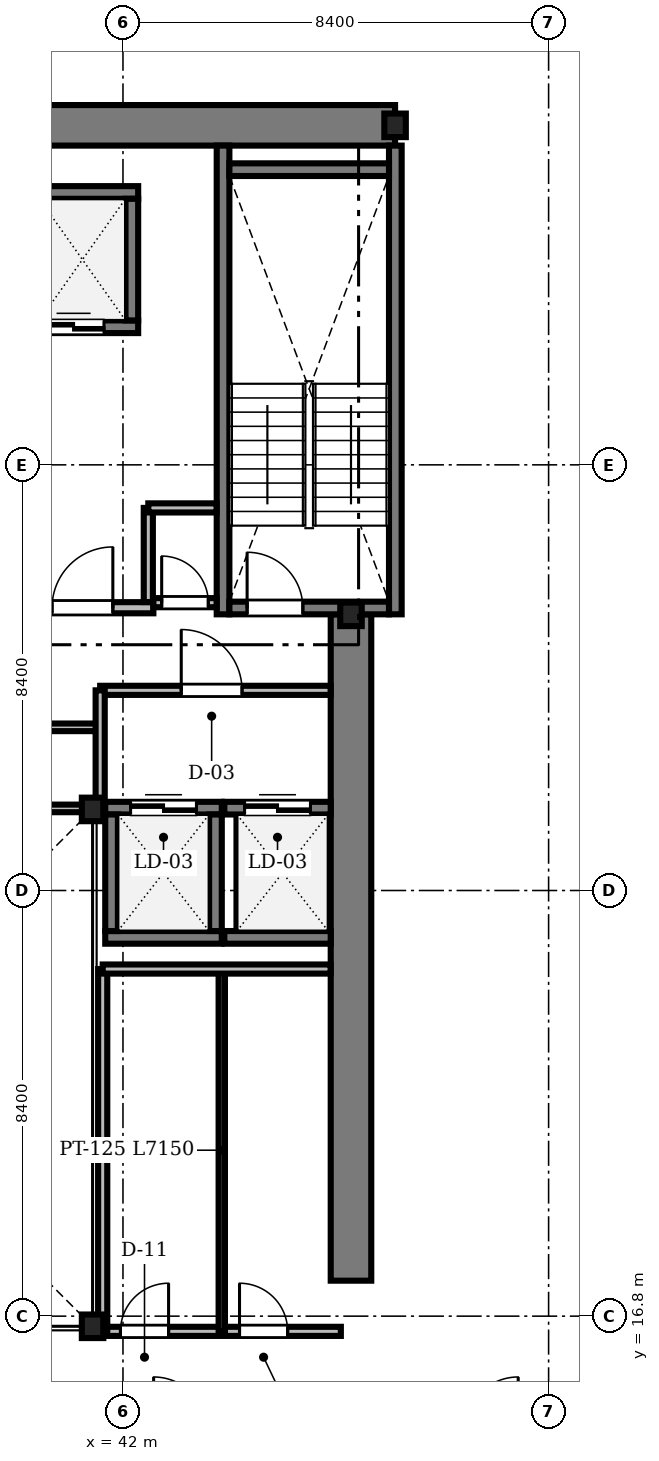
"""IFC4 building model, lengths in metres.
Left out: names, types, materials, properties, quantities, classifications, styles, units other than length and angle.
Written with IfcOpenShell. Run it as: python <this file> out.ifc"""

import sys

from ifc_helpers import new_model, si_unit, direction, frame, frame_2d, origin, origin_2d, place, context, subcontext, project, spatial, rectangle, i_section, extrude, source, transform, mapped, element, fill, save


model = new_model("IFC4")
c1 = context("Model", 3, precision=1e-05, world=origin(), true_north=direction((0.0, 1.0)))
c2 = subcontext(c1, "Body", "Model", "MODEL_VIEW")
j1 = project(units=[si_unit("LENGTHUNIT", "METRE"), si_unit("PLANEANGLEUNIT", "RADIAN")], contexts=[c1])
p1 = place(None, origin())
s1 = spatial("IfcSite", under=j1, at=p1, CompositionType="ELEMENT")
p2 = place(p1, origin())
s2 = spatial("IfcBuilding", under=s1, at=p2, CompositionType="ELEMENT")
p3 = place(p2, frame((0.0, 0.0, 103.7)))
s3 = spatial("IfcBuildingStorey", under=s2, at=p3, CompositionType="ELEMENT", Elevation=103.7)
m1 = source(origin(), c2, "Body", "SweptSolid", [
    extrude(rectangle(XDim=17.52, YDim=0.8, at=frame_2d((8.76, 0.0))), origin(), (0.0, 0.0, 1.0), 3.56),
])
p4 = place(p3, frame((29.85, 40.3, 0.0), z_axis=(0.0, 0.0, 1.0), x_axis=(1.0, 0.0, 0.0)))
e1 = element("IfcWall", 1, at=p4, inside=s3, PredefinedType="SHEAR", context=c2, shape_type="MappedRepresentation", body=[
    mapped(m1, transform((0.0, 0.0, 0.0), scale=1.0)),
])
m2 = source(origin(), c2, "Body", "SweptSolid", [
    extrude(rectangle(XDim=13.15, YDim=0.8, at=frame_2d((6.575, 0.0))), origin(), (0.0, 0.0, 1.0), 3.56),
])
p5 = place(p3, frame((46.5, 17.5, 0.0), z_axis=(0.0, 0.0, 1.0), x_axis=(0.0, 1.0, 0.0)))
e2 = element("IfcWall", 2, at=p5, inside=s3, PredefinedType="SHEAR", context=c2, shape_type="MappedRepresentation", body=[
    mapped(m2, transform((0.0, 0.0, 0.0), scale=1.0)),
])
m3 = source(origin(), c2, "Body", "SweptSolid", [
    extrude(i_section(OverallWidth=0.424, OverallDepth=0.465, WebThickness=0.035, FlangeThickness=0.056, FilletRadius=0.015, at=origin_2d()), origin(), (0.0, 0.0, 1.0), 3.56),
])
for number, where, z_axis, x_axis in (
    (3, (41.4, 16.6, 0.0), (0.0, 0.0, 1.0), (1.0, 0.0, 0.0)),
    (4, (41.4, 26.8, 0.0), (0.0, 0.0, 1.0), (1.0, 0.0, 0.0)),
    (5, (46.5, 30.65, 0.0), (0.0, 0.0, 1.0), (1.0, 0.0, 0.0)),
    (6, (47.37, 40.3, 0.0), (0.0, 0.0, 1.0), (1.0, 0.0, 0.0)),
):
    element("IfcColumn", number, at=place(p3, frame(where, z_axis=z_axis, x_axis=x_axis)), inside=s3, PredefinedType="COLUMN", context=c2, shape_type="MappedRepresentation", body=[
        mapped(m3, transform((0.0, 0.0, 0.0), scale=1.0)),
    ])
m4 = source(origin(), c2, "Body", "SweptSolid", [
    extrude(rectangle(XDim=9.25, YDim=0.25, at=frame_2d((4.625, 0.0))), origin(), (0.0, 0.0, 1.0), 3.6),
])
for number, where, z_axis, x_axis in (
    (7, (43.975, 30.65, 0.0), (0.0, 0.0, 1.0), (0.0, 1.0, 0.0)),
    (8, (47.375, 30.65, 0.0), (0.0, 0.0, 1.0), (0.0, 1.0, 0.0)),
):
    element("IfcWall", number, at=place(p3, frame(where, z_axis=z_axis, x_axis=x_axis)), inside=s3, PredefinedType="SOLIDWALL", context=c2, shape_type="MappedRepresentation", body=[
        mapped(m4, transform((0.0, 0.0, 0.0), scale=1.0)),
    ])
m5 = source(origin(), c2, "Body", "SweptSolid", [
    extrude(rectangle(XDim=3.15, YDim=0.25, at=frame_2d((1.575, 0.0))), origin(), (0.0, 0.0, 1.0), 3.6),
])
p6 = place(p3, frame((44.1, 39.425, 0.0), z_axis=(0.0, 0.0, 1.0), x_axis=(1.0, 0.0, 0.0)))
e9 = element("IfcWall", 9, at=p6, inside=s3, PredefinedType="SOLIDWALL", context=c2, shape_type="MappedRepresentation", body=[
    mapped(m5, transform((0.0, 0.0, 0.0), scale=1.0)),
])
p7 = place(p3, frame((44.1, 30.775, 0.0), z_axis=(0.0, 0.0, 1.0), x_axis=(1.0, 0.0, 0.0)))
e10 = element("IfcWall", 10, at=p7, inside=s3, PredefinedType="SOLIDWALL", context=c2, shape_type="MappedRepresentation", body=[
    mapped(m5, transform((0.0, 0.0, 0.0), scale=1.0)),
])
m6 = source(origin(), c2, "Body", "SweptSolid", [
    extrude(rectangle(XDim=1.1, YDim=2.2, at=frame_2d((0.55, 1.1))), frame((0.0, 0.135, 0.0), z_axis=(0.0, -1.0, 0.0), x_axis=(1.0, 0.0, 0.0)), (0.0, 0.0, 1.0), 0.27),
])
p8 = place(p7, frame((0.35, 0.0, 0.0)))
e11 = element("IfcOpeningElement", 11, at=p8, cuts=e10, PredefinedType="OPENING", context=c2, shape_type="MappedRepresentation", body=[
    mapped(m6, transform((0.0, 0.0, 0.0), scale=1.0)),
])
m7 = source(origin(), c2, "Body", "SweptSolid", [
    extrude(rectangle(XDim=2.8, YDim=0.22, at=frame_2d((1.4, 0.0))), origin(), (0.0, 0.0, 1.0), 3.56),
])
p9 = place(p3, frame((39.8, 30.78, 0.0), z_axis=(0.0, 0.0, 1.0), x_axis=(1.0, 0.0, 0.0)))
e12 = element("IfcWall", 12, at=p9, inside=s3, PredefinedType="SOLIDWALL", context=c2, shape_type="MappedRepresentation", body=[
    mapped(m7, transform((0.0, 0.0, 0.0), scale=1.0)),
])
m8 = source(origin(), c2, "Body", "SweptSolid", [
    extrude(rectangle(XDim=1.2, YDim=2.2, at=frame_2d((0.6, 1.1))), frame((0.0, 0.12, 0.0), z_axis=(0.0, -1.0, 0.0), x_axis=(1.0, 0.0, 0.0)), (0.0, 0.0, 1.0), 0.24),
])
p10 = place(p9, frame((0.8, 0.0, 0.0)))
e13 = element("IfcOpeningElement", 13, at=p10, cuts=e12, PredefinedType="OPENING", context=c2, shape_type="MappedRepresentation", body=[
    mapped(m8, transform((0.0, 0.0, 0.0), scale=1.0)),
])
m9 = source(origin(), c2, "Body", "SweptSolid", [
    extrude(rectangle(XDim=2.55, YDim=0.25, at=frame_2d((1.275, 0.0))), origin(), (0.0, 0.0, 1.0), 3.56),
])
p11 = place(p3, frame((39.75, 36.325, 0.0), z_axis=(0.0, 0.0, 1.0), x_axis=(1.0, 0.0, 0.0)))
e14 = element("IfcWall", 14, at=p11, inside=s3, PredefinedType="SOLIDWALL", context=c2, shape_type="MappedRepresentation", body=[
    mapped(m9, transform((0.0, 0.0, 0.0), scale=1.0)),
])
m10 = source(origin(), c2, "Body", "SweptSolid", [
    extrude(rectangle(XDim=1.2, YDim=2.25, at=frame_2d((0.6, 1.125))), frame((0.0, 0.135, 0.0), z_axis=(0.0, -1.0, 0.0), x_axis=(1.0, 0.0, 0.0)), (0.0, 0.0, 1.0), 0.27),
])
p12 = place(p11, frame((0.675, 0.0, 0.0)))
e15 = element("IfcOpeningElement", 15, at=p12, cuts=e14, PredefinedType="OPENING", context=c2, shape_type="MappedRepresentation", body=[
    mapped(m10, transform((0.0, 0.0, 0.0), scale=1.0)),
])
p13 = place(p3, frame((39.75, 38.975, 0.0), z_axis=(0.0, 0.0, 1.0), x_axis=(1.0, 0.0, 0.0)))
e16 = element("IfcWall", 16, at=p13, inside=s3, PredefinedType="SOLIDWALL", context=c2, shape_type="MappedRepresentation", body=[
    mapped(m9, transform((0.0, 0.0, 0.0), scale=1.0)),
])
m11 = source(origin(), c2, "Body", "SweptSolid", [
    extrude(rectangle(XDim=2.4, YDim=0.25, at=frame_2d((1.2, 0.0))), origin(), (0.0, 0.0, 1.0), 3.56),
])
p14 = place(p3, frame((42.175, 36.45, 0.0), z_axis=(0.0, 0.0, 1.0), x_axis=(0.0, 1.0, 0.0)))
e17 = element("IfcWall", 17, at=p14, inside=s3, PredefinedType="SOLIDWALL", context=c2, shape_type="MappedRepresentation", body=[
    mapped(m11, transform((0.0, 0.0, 0.0), scale=1.0)),
])
m12 = source(origin(), c2, "Body", "SweptSolid", [
    extrude(rectangle(XDim=2.3, YDim=0.25, at=frame_2d((1.15, 0.0))), origin(), (0.0, 0.0, 1.0), 3.56),
])
p15 = place(p3, frame((41.65, 24.275, 0.0), z_axis=(0.0, 0.0, 1.0), x_axis=(1.0, 0.0, 0.0)))
e18 = element("IfcWall", 18, at=p15, inside=s3, PredefinedType="SOLIDWALL", context=c2, shape_type="MappedRepresentation", body=[
    mapped(m12, transform((0.0, 0.0, 0.0), scale=1.0)),
])
p16 = place(p3, frame((41.65, 26.825, 0.0), z_axis=(0.0, 0.0, 1.0), x_axis=(1.0, 0.0, 0.0)))
e19 = element("IfcWall", 19, at=p16, inside=s3, PredefinedType="SOLIDWALL", context=c2, shape_type="MappedRepresentation", body=[
    mapped(m12, transform((0.0, 0.0, 0.0), scale=1.0)),
])
m13 = source(origin(), c2, "Body", "SweptSolid", [
    extrude(rectangle(XDim=1.3, YDim=2.3, at=frame_2d((0.65, 1.15))), frame((0.0, 0.135, 0.0), z_axis=(0.0, -1.0, 0.0), x_axis=(1.0, 0.0, 0.0)), (0.0, 0.0, 1.0), 0.27),
])
p17 = place(p16, frame((0.5, 0.0, 0.0)))
e20 = element("IfcOpeningElement", 20, at=p17, cuts=e19, PredefinedType="OPENING", context=c2, shape_type="MappedRepresentation", body=[
    mapped(m13, transform((0.0, 0.0, 0.0), scale=1.0)),
])
for number, where, z_axis, x_axis in (
    (21, (41.775, 24.4, 0.0), (0.0, 0.0, 1.0), (0.0, 1.0, 0.0)),
    (22, (43.825, 24.4, 0.0), (0.0, 0.0, 1.0), (0.0, 1.0, 0.0)),
):
    element("IfcWall", number, at=place(p3, frame(where, z_axis=z_axis, x_axis=x_axis)), inside=s3, PredefinedType="SOLIDWALL", context=c2, shape_type="MappedRepresentation", body=[
        mapped(m12, transform((0.0, 0.0, 0.0), scale=1.0)),
    ])
m14 = source(origin(), c2, "Body", "SweptSolid", [
    extrude(rectangle(XDim=2.1, YDim=0.25, at=frame_2d((1.05, 0.0))), origin(), (0.0, 0.0, 1.0), 3.56),
])
p18 = place(p3, frame((44.0, 24.275, 0.0), z_axis=(0.0, 0.0, 1.0), x_axis=(1.0, 0.0, 0.0)))
e23 = element("IfcWall", 23, at=p18, inside=s3, PredefinedType="SOLIDWALL", context=c2, shape_type="MappedRepresentation", body=[
    mapped(m14, transform((0.0, 0.0, 0.0), scale=1.0)),
])
p19 = place(p3, frame((44.0, 26.825, 0.0), z_axis=(0.0, 0.0, 1.0), x_axis=(1.0, 0.0, 0.0)))
e24 = element("IfcWall", 24, at=p19, inside=s3, PredefinedType="SOLIDWALL", context=c2, shape_type="MappedRepresentation", body=[
    mapped(m14, transform((0.0, 0.0, 0.0), scale=1.0)),
])
p20 = place(p19, frame((0.4, 0.0, 0.0)))
e25 = element("IfcOpeningElement", 25, at=p20, cuts=e24, PredefinedType="OPENING", context=c2, shape_type="MappedRepresentation", body=[
    mapped(m13, transform((0.0, 0.0, 0.0), scale=1.0)),
])
m15 = source(origin(), c2, "Body", "SweptSolid", [
    extrude(rectangle(XDim=4.548, YDim=0.18, at=frame_2d((2.274, 0.0))), origin(), (0.0, 0.0, 1.0), 3.192),
])
p21 = place(p3, frame((41.55, 29.15, 0.0), z_axis=(0.0, 0.0, 1.0), x_axis=(1.0, 0.0, 0.0)))
e26 = element("IfcWall", 26, at=p21, inside=s3, PredefinedType="PARTITIONING", context=c2, shape_type="MappedRepresentation", body=[
    mapped(m15, transform((0.0, 0.0, 0.0), scale=1.0)),
])
m16 = source(origin(), c2, "Body", "SweptSolid", [
    extrude(rectangle(XDim=1.2, YDim=2.2, at=frame_2d((0.6, 1.1))), frame((0.0, 0.1, 0.0), z_axis=(0.0, -1.0, 0.0), x_axis=(1.0, 0.0, 0.0)), (0.0, 0.0, 1.0), 0.2),
])
p22 = place(p21, frame((1.6, 0.0, 0.0)))
e27 = element("IfcOpeningElement", 27, at=p22, cuts=e26, PredefinedType="OPENING", context=c2, shape_type="MappedRepresentation", body=[
    mapped(m16, transform((0.0, 0.0, 0.0), scale=1.0)),
])
m17 = source(origin(), c2, "Body", "SweptSolid", [
    extrude(rectangle(XDim=4.7, YDim=0.18, at=frame_2d((2.35, 0.0))), origin(), (0.0, 0.0, 1.0), 2.952),
])
p23 = place(p3, frame((41.6, 16.5, 0.0), z_axis=(0.0, 0.0, 1.0), x_axis=(1.0, 0.0, 0.0)))
e28 = element("IfcWall", 28, at=p23, inside=s3, PredefinedType="PARTITIONING", context=c2, shape_type="MappedRepresentation", body=[
    mapped(m17, transform((0.0, 0.0, 0.0), scale=1.0)),
])
m18 = source(origin(), c2, "Body", "SweptSolid", [
    extrude(rectangle(XDim=0.95, YDim=2.15, at=frame_2d((0.475, 1.075))), frame((0.0, 0.1, 0.0), z_axis=(0.0, -1.0, 0.0), x_axis=(1.0, 0.0, 0.0)), (0.0, 0.0, 1.0), 0.2),
])
p24 = place(p23, frame((0.35, 0.0, 0.0)))
e29 = element("IfcOpeningElement", 29, at=p24, cuts=e28, PredefinedType="OPENING", context=c2, shape_type="MappedRepresentation", body=[
    mapped(m18, transform((0.0, 0.0, 0.0), scale=1.0)),
])
p25 = place(p23, frame((2.7, 0.0, 0.0)))
e30 = element("IfcOpeningElement", 30, at=p25, cuts=e28, PredefinedType="OPENING", context=c2, shape_type="MappedRepresentation", body=[
    mapped(m18, transform((0.0, 0.0, 0.0), scale=1.0)),
])
m19 = source(origin(), c2, "Body", "SweptSolid", [
    extrude(rectangle(XDim=3.0, YDim=0.15, at=frame_2d((1.5, 0.0))), origin(), (0.0, 0.0, 1.0), 3.56),
])
p26 = place(p3, frame((38.52, 28.42, 0.0), z_axis=(0.0, 0.0, 1.0), x_axis=(1.0, 0.0, 0.0)))
e31 = element("IfcWall", 31, at=p26, inside=s3, PredefinedType="PARTITIONING", context=c2, shape_type="MappedRepresentation", body=[
    mapped(m19, transform((0.0, 0.0, 0.0), scale=1.0)),
])
m20 = source(origin(), c2, "Body", "SweptSolid", [
    extrude(rectangle(XDim=0.92, YDim=2.1, at=frame_2d((0.46, 1.05))), frame((0.0, 0.085, 0.0), z_axis=(0.0, -1.0, 0.0), x_axis=(1.0, 0.0, 0.0)), (0.0, 0.0, 1.0), 0.17),
])
p27 = place(p26, frame((0.83, 0.0, 0.0)))
e32 = element("IfcOpeningElement", 32, at=p27, cuts=e31, PredefinedType="OPENING", context=c2, shape_type="MappedRepresentation", body=[
    mapped(m20, transform((0.0, 0.0, 0.0), scale=1.0)),
])
m21 = source(origin(), c2, "Body", "SweptSolid", [
    extrude(rectangle(XDim=1.248, YDim=0.18, at=frame_2d((0.624, 0.0))), origin(), (0.0, 0.0, 1.0), 3.56),
])
p28 = place(p3, frame((42.6, 30.88, 0.0), z_axis=(0.0, 0.0, 1.0), x_axis=(1.0, 0.0, 0.0)))
e33 = element("IfcWall", 33, at=p28, inside=s3, PredefinedType="PARTITIONING", context=c2, shape_type="MappedRepresentation", body=[
    mapped(m21, transform((0.0, 0.0, 0.0), scale=1.0)),
])
m22 = source(origin(), c2, "Body", "SweptSolid", [
    extrude(rectangle(XDim=0.92, YDim=2.1, at=frame_2d((0.46, 1.05))), frame((0.0, 0.1, 0.0), z_axis=(0.0, -1.0, 0.0), x_axis=(1.0, 0.0, 0.0)), (0.0, 0.0, 1.0), 0.2),
])
p29 = place(p28, frame((0.164, 0.0, 0.0)))
e34 = element("IfcOpeningElement", 34, at=p29, cuts=e33, PredefinedType="OPENING", context=c2, shape_type="MappedRepresentation", body=[
    mapped(m22, transform((0.0, 0.0, 0.0), scale=1.0)),
])
m23 = source(origin(), c2, "Body", "SweptSolid", [
    extrude(rectangle(XDim=7.15, YDim=0.18, at=frame_2d((3.575, 0.0))), origin(), (0.0, 0.0, 1.0), 2.952),
])
p30 = place(p3, frame((41.6, 16.5, 0.0), z_axis=(0.0, 0.0, 1.0), x_axis=(0.0, 1.0, 0.0)))
e35 = element("IfcWall", 35, at=p30, inside=s3, PredefinedType="PARTITIONING", context=c2, shape_type="MappedRepresentation", body=[
    mapped(m23, transform((0.0, 0.0, 0.0), scale=1.0)),
])
m24 = source(origin(), c2, "Body", "SweptSolid", [
    extrude(rectangle(XDim=7.15, YDim=0.125, at=frame_2d((3.575, 0.0))), origin(), (0.0, 0.0, 1.0), 2.952),
])
p31 = place(p3, frame((43.95, 16.5, 0.0), z_axis=(0.0, 0.0, 1.0), x_axis=(0.0, 1.0, 0.0)))
e36 = element("IfcWall", 36, at=p31, inside=s3, PredefinedType="PARTITIONING", context=c2, shape_type="MappedRepresentation", body=[
    mapped(m24, transform((0.0, 0.0, 0.0), scale=1.0)),
])
m25 = source(origin(), c2, "Body", "SweptSolid", [
    extrude(rectangle(XDim=4.498, YDim=0.18, at=frame_2d((2.249, 0.0))), origin(), (0.0, 0.0, 1.0), 3.56),
])
p32 = place(p3, frame((41.6, 23.65, 0.0), z_axis=(0.0, 0.0, 1.0), x_axis=(1.0, 0.0, 0.0)))
e37 = element("IfcWall", 37, at=p32, inside=s3, PredefinedType="PARTITIONING", context=c2, shape_type="MappedRepresentation", body=[
    mapped(m25, transform((0.0, 0.0, 0.0), scale=1.0)),
])
m26 = source(origin(), c2, "Body", "SweptSolid", [
    extrude(rectangle(XDim=3.0, YDim=0.15, at=frame_2d((1.5, 0.0))), origin(), (0.0, 0.0, 1.0), 2.952),
])
p33 = place(p3, frame((38.52, 26.82, 0.0), z_axis=(0.0, 0.0, 1.0), x_axis=(1.0, 0.0, 0.0)))
e38 = element("IfcWall", 38, at=p33, inside=s3, PredefinedType="PARTITIONING", context=c2, shape_type="MappedRepresentation", body=[
    mapped(m26, transform((0.0, 0.0, 0.0), scale=1.0)),
])
m27 = source(origin(), c2, "Body", "SweptSolid", [
    extrude(rectangle(XDim=2.35, YDim=0.18, at=frame_2d((1.175, 0.0))), origin(), (0.0, 0.0, 1.0), 2.952),
])
p34 = place(p3, frame((41.55, 26.8, 0.0), z_axis=(0.0, 0.0, 1.0), x_axis=(0.0, 1.0, 0.0)))
e39 = element("IfcWall", 39, at=p34, inside=s3, PredefinedType="PARTITIONING", context=c2, shape_type="MappedRepresentation", body=[
    mapped(m27, transform((0.0, 0.0, 0.0), scale=1.0)),
])
m28 = source(origin(), c2, "Body", "SweptSolid", [
    extrude(rectangle(XDim=1.858, YDim=0.18, at=frame_2d((0.929, 0.0))), origin(), (0.0, 0.0, 1.0), 3.56),
])
p35 = place(p3, frame((42.5, 30.892, 0.0), z_axis=(0.0, 0.0, 1.0), x_axis=(0.0, 1.0, 0.0)))
e40 = element("IfcWall", 40, at=p35, inside=s3, PredefinedType="PARTITIONING", context=c2, shape_type="MappedRepresentation", body=[
    mapped(m28, transform((0.0, 0.0, 0.0), scale=1.0)),
])
m29 = source(origin(), c2, "Body", "SweptSolid", [
    extrude(rectangle(XDim=1.348, YDim=0.18, at=frame_2d((0.674, 0.0))), origin(), (0.0, 0.0, 1.0), 3.56),
])
p36 = place(p3, frame((42.5, 32.75, 0.0), z_axis=(0.0, 0.0, 1.0), x_axis=(1.0, 0.0, 0.0)))
e41 = element("IfcWall", 41, at=p36, inside=s3, PredefinedType="PARTITIONING", context=c2, shape_type="MappedRepresentation", body=[
    mapped(m29, transform((0.0, 0.0, 0.0), scale=1.0)),
])
m30 = source(origin(), c2, "Body", "SweptSolid", [
    extrude(rectangle(XDim=1.1, YDim=2.2, at=frame_2d((0.55, 1.1))), frame((0.0, 0.025, 0.0), z_axis=(0.0, -1.0, 0.0), x_axis=(1.0, 0.0, 0.0)), (0.0, 0.0, 1.0), 0.05),
])
p37 = place(p8, origin())
e42 = element("IfcDoor", 42, at=p37, inside=s3, OperationType="SINGLE_SWING_LEFT", PredefinedType="DOOR", context=c2, shape_type="MappedRepresentation", body=[
    mapped(m30, transform((0.0, 0.0, 0.0), scale=1.0)),
])
fill(e11, e42)
m31 = source(origin(), c2, "Body", "SweptSolid", [
    extrude(rectangle(XDim=1.2, YDim=2.2, at=frame_2d((0.6, 1.1))), frame((0.0, 0.025, 0.0), z_axis=(0.0, -1.0, 0.0), x_axis=(1.0, 0.0, 0.0)), (0.0, 0.0, 1.0), 0.05),
])
p38 = place(p10, origin())
e43 = element("IfcDoor", 43, at=p38, inside=s3, OperationType="SINGLE_SWING_RIGHT", PredefinedType="DOOR", context=c2, shape_type="MappedRepresentation", body=[
    mapped(m31, transform((0.0, 0.0, 0.0), scale=1.0)),
])
fill(e13, e43)
m32 = source(origin(), c2, "Body", "SweptSolid", [
    extrude(rectangle(XDim=1.2, YDim=2.25, at=frame_2d((0.6, 1.125))), frame((0.0, 0.025, 0.0), z_axis=(0.0, -1.0, 0.0), x_axis=(1.0, 0.0, 0.0)), (0.0, 0.0, 1.0), 0.05),
])
p39 = place(p12, origin())
e44 = element("IfcDoor", 44, at=p39, inside=s3, OperationType="DOUBLE_DOOR_SLIDING", PredefinedType="DOOR", context=c2, shape_type="MappedRepresentation", body=[
    mapped(m32, transform((0.0, 0.0, 0.0), scale=1.0)),
])
fill(e15, e44)
m33 = source(origin(), c2, "Body", "SweptSolid", [
    extrude(rectangle(XDim=1.3, YDim=2.3, at=frame_2d((0.65, 1.15))), frame((0.0, 0.025, 0.0), z_axis=(0.0, -1.0, 0.0), x_axis=(1.0, 0.0, 0.0)), (0.0, 0.0, 1.0), 0.05),
])
p40 = place(p17, origin())
e45 = element("IfcDoor", 45, at=p40, inside=s3, OperationType="DOUBLE_DOOR_SLIDING", PredefinedType="DOOR", context=c2, shape_type="MappedRepresentation", body=[
    mapped(m33, transform((0.0, 0.0, 0.0), scale=1.0)),
])
fill(e20, e45)
p41 = place(p20, origin())
e46 = element("IfcDoor", 46, at=p41, inside=s3, OperationType="DOUBLE_DOOR_SLIDING", PredefinedType="DOOR", context=c2, shape_type="MappedRepresentation", body=[
    mapped(m33, transform((0.0, 0.0, 0.0), scale=1.0)),
])
fill(e25, e46)
p42 = place(p22, origin())
e47 = element("IfcDoor", 47, at=p42, inside=s3, OperationType="SINGLE_SWING_LEFT", PredefinedType="DOOR", context=c2, shape_type="MappedRepresentation", body=[
    mapped(m31, transform((0.0, 0.0, 0.0), scale=1.0)),
])
fill(e27, e47)
m34 = source(origin(), c2, "Body", "SweptSolid", [
    extrude(rectangle(XDim=0.95, YDim=2.15, at=frame_2d((0.475, 1.075))), frame((0.0, 0.025, 0.0), z_axis=(0.0, -1.0, 0.0), x_axis=(1.0, 0.0, 0.0)), (0.0, 0.0, 1.0), 0.05),
])
p43 = place(p24, origin())
e48 = element("IfcDoor", 48, at=p43, inside=s3, OperationType="SINGLE_SWING_RIGHT", PredefinedType="DOOR", context=c2, shape_type="MappedRepresentation", body=[
    mapped(m34, transform((0.0, 0.0, 0.0), scale=1.0)),
])
fill(e29, e48)
p44 = place(p25, origin())
e49 = element("IfcDoor", 49, at=p44, inside=s3, OperationType="SINGLE_SWING_LEFT", PredefinedType="DOOR", context=c2, shape_type="MappedRepresentation", body=[
    mapped(m34, transform((0.0, 0.0, 0.0), scale=1.0)),
])
fill(e30, e49)
m35 = source(origin(), c2, "Body", "SweptSolid", [
    extrude(rectangle(XDim=0.92, YDim=2.1, at=frame_2d((0.46, 1.05))), frame((0.0, 0.025, 0.0), z_axis=(0.0, -1.0, 0.0), x_axis=(1.0, 0.0, 0.0)), (0.0, 0.0, 1.0), 0.05),
])
p45 = place(p29, origin())
e50 = element("IfcDoor", 50, at=p45, inside=s3, OperationType="SINGLE_SWING_LEFT", PredefinedType="DOOR", context=c2, shape_type="MappedRepresentation", body=[
    mapped(m35, transform((0.0, 0.0, 0.0), scale=1.0)),
])
fill(e34, e50)
save(model, sys.argv[1])
